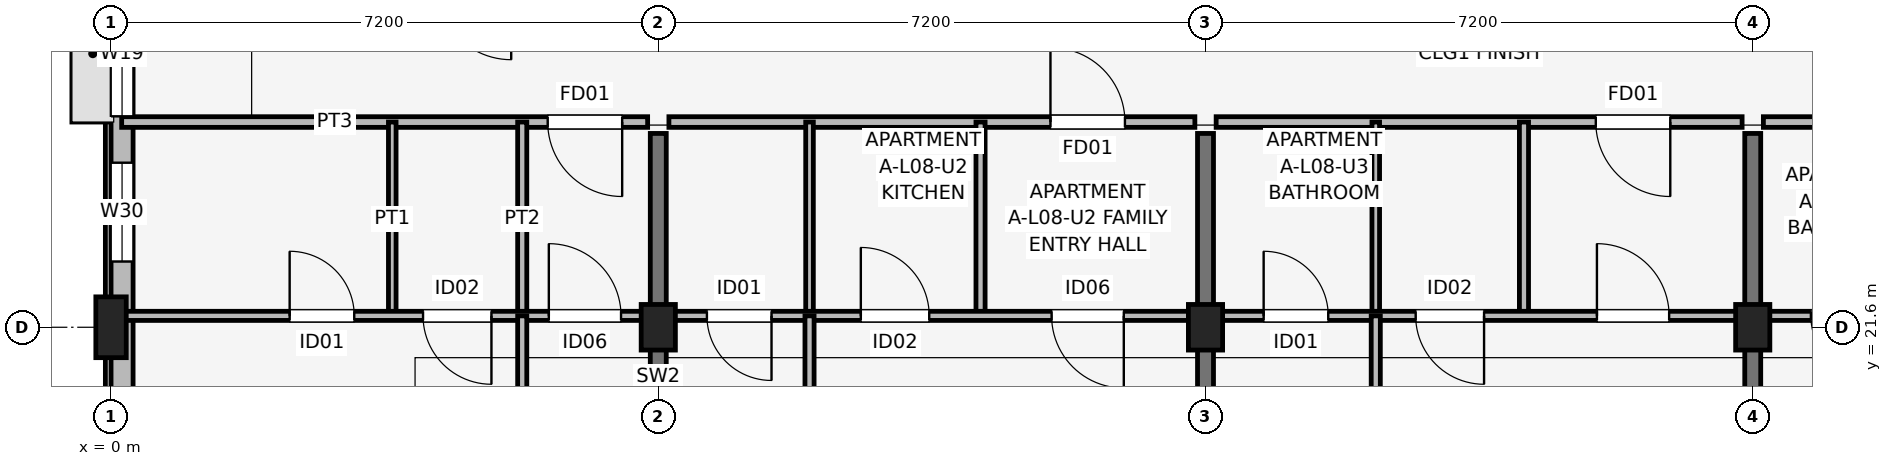
"""IFC4 building model, lengths in metres.
Left out: names, types, materials, properties, quantities, classifications, styles, units other than length and angle.
Written with IfcOpenShell. Run it as: python <this file> out.ifc"""

import sys

from ifc_helpers import new_model, si_unit, direction, frame, frame_2d, origin, origin_2d, place, context, subcontext, project, spatial, rectangle, extrude, element, fill, save


model = new_model("IFC4")
c1 = context("Model", 3, precision=1e-05, world=origin(), true_north=direction((0.0, 1.0)))
c2 = subcontext(c1, "Body", "Model", "MODEL_VIEW")
j1 = project(units=[si_unit("LENGTHUNIT", "METRE"), si_unit("PLANEANGLEUNIT", "RADIAN")], contexts=[c1])
p1 = place(None, origin())
s1 = spatial("IfcSite", under=j1, at=p1, CompositionType="ELEMENT")
p2 = place(p1, origin())
s2 = spatial("IfcBuilding", under=s1, at=p2, CompositionType="ELEMENT")
p3 = place(p2, frame((0.0, 0.0, 27.6)))
s3 = spatial("IfcBuildingStorey", under=s2, at=p3, CompositionType="ELEMENT", Elevation=27.6)
p4 = place(p3, frame((0.0, 21.6, 0.0), z_axis=(0.0, 0.0, 1.0), x_axis=(1.0, 0.0, 0.0)))
e1 = element("IfcColumn", 1, at=p4, inside=s3, PredefinedType="COLUMN", context=c2, shape_type="SweptSolid", body=[
    extrude(rectangle(XDim=0.4, YDim=0.8, at=origin_2d()), origin(), (0.0, 0.0, 1.0), 3.15),
])
for number, where, z_axis, x_axis in (
    (2, (7.2, 21.6, 0.0), (0.0, 0.0, 1.0), (1.0, 0.0, 0.0)),
    (3, (14.4, 21.6, 0.0), (0.0, 0.0, 1.0), (1.0, 0.0, 0.0)),
    (4, (21.6, 21.6, 0.0), (0.0, 0.0, 1.0), (1.0, 0.0, 0.0)),
):
    element("IfcColumn", number, at=place(p3, frame(where, z_axis=z_axis, x_axis=x_axis)), inside=s3, PredefinedType="COLUMN", context=c2, shape_type="SweptSolid", body=[
        extrude(rectangle(XDim=0.45, YDim=0.6, at=origin_2d()), origin(), (0.0, 0.0, 1.0), 3.15),
    ])
for number, where, z_axis, x_axis in (
    (5, (7.2, 17.75, 0.0), (0.0, 0.0, 1.0), (0.0, 1.0, 0.0)),
    (6, (14.4, 17.75, 0.0), (0.0, 0.0, 1.0), (0.0, 1.0, 0.0)),
    (7, (21.6, 17.75, 0.0), (0.0, 0.0, 1.0), (0.0, 1.0, 0.0)),
):
    element("IfcWall", number, at=place(p3, frame(where, z_axis=z_axis, x_axis=x_axis)), inside=s3, PredefinedType="SHEAR", context=c2, shape_type="SweptSolid", body=[
        extrude(rectangle(XDim=6.4, YDim=0.21, at=frame_2d((3.2, 0.0))), origin(), (0.0, 0.0, 1.0), 3.15),
    ])
p5 = place(p3, frame((0.145, 33.4, 0.0), z_axis=(0.0, 0.0, 1.0), x_axis=(0.0, -1.0, 0.0)))
e8 = element("IfcWall", 8, at=p5, inside=s3, PredefinedType="SOLIDWALL", context=c2, shape_type="SweptSolid", body=[
    extrude(rectangle(XDim=13.4, YDim=0.29, at=frame_2d((6.7, 0.0))), origin(), (0.0, 0.0, 1.0), 2.43),
])
p6 = place(p5, frame((7.375, 0.0, 1.05)))
e9 = element("IfcOpeningElement", 9, at=p6, cuts=e8, PredefinedType="OPENING", context=c2, shape_type="SweptSolid", body=[
    extrude(rectangle(XDim=1.65, YDim=1.15, at=frame_2d((0.825, 0.575))), frame((0.0, 0.155, 0.0), z_axis=(0.0, -1.0, 0.0), x_axis=(1.0, 0.0, 0.0)), (0.0, 0.0, 1.0), 0.31),
])
p7 = place(p5, frame((9.635, 0.0, 0.75)))
e10 = element("IfcOpeningElement", 10, at=p7, cuts=e8, PredefinedType="OPENING", context=c2, shape_type="SweptSolid", body=[
    extrude(rectangle(XDim=1.3, YDim=1.55, at=frame_2d((0.65, 0.775))), frame((0.0, 0.155, 0.0), z_axis=(0.0, -1.0, 0.0), x_axis=(1.0, 0.0, 0.0)), (0.0, 0.0, 1.0), 0.31),
])
p8 = place(p3, frame((0.14, 24.3, 0.0), z_axis=(0.0, 0.0, 1.0), x_axis=(1.0, 0.0, 0.0)))
e11 = element("IfcWall", 11, at=p8, inside=s3, PredefinedType="PARTITIONING", context=c2, shape_type="SweptSolid", body=[
    extrude(rectangle(XDim=6.92, YDim=0.14, at=frame_2d((3.46, 0.0))), origin(), (0.0, 0.0, 1.0), 2.38),
])
p9 = place(p8, frame((6.585, 0.0, 0.0), z_axis=(0.0, 0.0, 1.0), x_axis=(-1.0, 0.0, 0.0)))
e12 = element("IfcOpeningElement", 12, at=p9, cuts=e11, PredefinedType="OPENING", context=c2, shape_type="SweptSolid", body=[
    extrude(rectangle(XDim=0.98, YDim=2.1, at=frame_2d((0.49, 1.05))), frame((0.0, 0.08, 0.0), z_axis=(0.0, -1.0, 0.0), x_axis=(1.0, 0.0, 0.0)), (0.0, 0.0, 1.0), 0.16),
])
p10 = place(p3, frame((3.7, 21.75, 0.0), z_axis=(0.0, 0.0, 1.0), x_axis=(0.0, 1.0, 0.0)))
e13 = element("IfcWall", 13, at=p10, inside=s3, PredefinedType="PARTITIONING", context=c2, shape_type="SweptSolid", body=[
    extrude(rectangle(XDim=2.55, YDim=0.1, at=frame_2d((1.275, 0.0))), origin(), (0.0, 0.0, 1.0), 2.38),
])
p11 = place(p3, frame((5.41, 21.75, 0.0), z_axis=(0.0, 0.0, 1.0), x_axis=(0.0, 1.0, 0.0)))
e14 = element("IfcWall", 14, at=p11, inside=s3, PredefinedType="PARTITIONING", context=c2, shape_type="SweptSolid", body=[
    extrude(rectangle(XDim=2.55, YDim=0.12, at=frame_2d((1.275, 0.0))), origin(), (0.0, 0.0, 1.0), 2.38),
])
p12 = place(p3, frame((0.14, 21.75, 0.0), z_axis=(0.0, 0.0, 1.0), x_axis=(1.0, 0.0, 0.0)))
e15 = element("IfcWall", 15, at=p12, inside=s3, PredefinedType="PARTITIONING", context=c2, shape_type="SweptSolid", body=[
    extrude(rectangle(XDim=6.92, YDim=0.12, at=frame_2d((3.46, 0.0))), origin(), (0.0, 0.0, 1.0), 2.38),
])
p13 = place(p12, frame((2.21, 0.0, 0.0)))
e16 = element("IfcOpeningElement", 16, at=p13, cuts=e15, PredefinedType="OPENING", context=c2, shape_type="SweptSolid", body=[
    extrude(rectangle(XDim=0.85, YDim=2.08, at=frame_2d((0.425, 1.04))), frame((0.0, 0.07, 0.0), z_axis=(0.0, -1.0, 0.0), x_axis=(1.0, 0.0, 0.0)), (0.0, 0.0, 1.0), 0.14),
])
p14 = place(p12, frame((4.865, 0.0, 0.0), z_axis=(0.0, 0.0, 1.0), x_axis=(-1.0, 0.0, 0.0)))
e17 = element("IfcOpeningElement", 17, at=p14, cuts=e15, PredefinedType="OPENING", context=c2, shape_type="SweptSolid", body=[
    extrude(rectangle(XDim=0.9, YDim=2.08, at=frame_2d((0.45, 1.04))), frame((0.0, 0.07, 0.0), z_axis=(0.0, -1.0, 0.0), x_axis=(1.0, 0.0, 0.0)), (0.0, 0.0, 1.0), 0.14),
])
p15 = place(p12, frame((5.62, 0.0, 0.0)))
e18 = element("IfcOpeningElement", 18, at=p15, cuts=e15, PredefinedType="OPENING", context=c2, shape_type="SweptSolid", body=[
    extrude(rectangle(XDim=0.95, YDim=2.08, at=frame_2d((0.475, 1.04))), frame((0.0, 0.07, 0.0), z_axis=(0.0, -1.0, 0.0), x_axis=(1.0, 0.0, 0.0)), (0.0, 0.0, 1.0), 0.14),
])
p16 = place(p3, frame((5.41, 17.7, 0.0), z_axis=(0.0, 0.0, 1.0), x_axis=(0.0, 1.0, 0.0)))
e19 = element("IfcWall", 19, at=p16, inside=s3, PredefinedType="PARTITIONING", context=c2, shape_type="SweptSolid", body=[
    extrude(rectangle(XDim=4.05, YDim=0.12, at=frame_2d((2.025, 0.0))), origin(), (0.0, 0.0, 1.0), 2.38),
])
p17 = place(p16, frame((2.475, 0.0, 0.0), z_axis=(0.0, 0.0, 1.0), x_axis=(-1.0, 0.0, 0.0)))
e20 = element("IfcOpeningElement", 20, at=p17, cuts=e19, PredefinedType="OPENING", context=c2, shape_type="SweptSolid", body=[
    extrude(rectangle(XDim=0.9, YDim=2.08, at=frame_2d((0.45, 1.04))), frame((0.0, 0.07, 0.0), z_axis=(0.0, -1.0, 0.0), x_axis=(1.0, 0.0, 0.0)), (0.0, 0.0, 1.0), 0.14),
])
p18 = place(p3, frame((7.34, 24.3, 0.0), z_axis=(0.0, 0.0, 1.0), x_axis=(1.0, 0.0, 0.0)))
e21 = element("IfcWall", 21, at=p18, inside=s3, PredefinedType="PARTITIONING", context=c2, shape_type="SweptSolid", body=[
    extrude(rectangle(XDim=6.92, YDim=0.14, at=frame_2d((3.46, 0.0))), origin(), (0.0, 0.0, 1.0), 2.38),
])
p19 = place(p18, frame((5.02, 0.0, 0.0)))
e22 = element("IfcOpeningElement", 22, at=p19, cuts=e21, PredefinedType="OPENING", context=c2, shape_type="SweptSolid", body=[
    extrude(rectangle(XDim=0.98, YDim=2.1, at=frame_2d((0.49, 1.05))), frame((0.0, 0.08, 0.0), z_axis=(0.0, -1.0, 0.0), x_axis=(1.0, 0.0, 0.0)), (0.0, 0.0, 1.0), 0.16),
])
p20 = place(p3, frame((9.19, 21.75, 0.0), z_axis=(0.0, 0.0, 1.0), x_axis=(0.0, 1.0, 0.0)))
e23 = element("IfcWall", 23, at=p20, inside=s3, PredefinedType="PARTITIONING", context=c2, shape_type="SweptSolid", body=[
    extrude(rectangle(XDim=2.55, YDim=0.1, at=frame_2d((1.275, 0.0))), origin(), (0.0, 0.0, 1.0), 2.38),
])
p21 = place(p3, frame((11.44, 21.75, 0.0), z_axis=(0.0, 0.0, 1.0), x_axis=(0.0, 1.0, 0.0)))
e24 = element("IfcWall", 24, at=p21, inside=s3, PredefinedType="PARTITIONING", context=c2, shape_type="SweptSolid", body=[
    extrude(rectangle(XDim=2.55, YDim=0.12, at=frame_2d((1.275, 0.0))), origin(), (0.0, 0.0, 1.0), 2.38),
])
p22 = place(p3, frame((7.34, 21.75, 0.0), z_axis=(0.0, 0.0, 1.0), x_axis=(1.0, 0.0, 0.0)))
e25 = element("IfcWall", 25, at=p22, inside=s3, PredefinedType="PARTITIONING", context=c2, shape_type="SweptSolid", body=[
    extrude(rectangle(XDim=6.92, YDim=0.12, at=frame_2d((3.46, 0.0))), origin(), (0.0, 0.0, 1.0), 2.38),
])
p23 = place(p22, frame((1.35, 0.0, 0.0), z_axis=(0.0, 0.0, 1.0), x_axis=(-1.0, 0.0, 0.0)))
e26 = element("IfcOpeningElement", 26, at=p23, cuts=e25, PredefinedType="OPENING", context=c2, shape_type="SweptSolid", body=[
    extrude(rectangle(XDim=0.85, YDim=2.08, at=frame_2d((0.425, 1.04))), frame((0.0, 0.07, 0.0), z_axis=(0.0, -1.0, 0.0), x_axis=(1.0, 0.0, 0.0)), (0.0, 0.0, 1.0), 0.14),
])
p24 = place(p22, frame((2.525, 0.0, 0.0)))
e27 = element("IfcOpeningElement", 27, at=p24, cuts=e25, PredefinedType="OPENING", context=c2, shape_type="SweptSolid", body=[
    extrude(rectangle(XDim=0.9, YDim=2.08, at=frame_2d((0.45, 1.04))), frame((0.0, 0.07, 0.0), z_axis=(0.0, -1.0, 0.0), x_axis=(1.0, 0.0, 0.0)), (0.0, 0.0, 1.0), 0.14),
])
p25 = place(p22, frame((5.985, 0.0, 0.0), z_axis=(0.0, 0.0, 1.0), x_axis=(-1.0, 0.0, 0.0)))
e28 = element("IfcOpeningElement", 28, at=p25, cuts=e25, PredefinedType="OPENING", context=c2, shape_type="SweptSolid", body=[
    extrude(rectangle(XDim=0.95, YDim=2.08, at=frame_2d((0.475, 1.04))), frame((0.0, 0.07, 0.0), z_axis=(0.0, -1.0, 0.0), x_axis=(1.0, 0.0, 0.0)), (0.0, 0.0, 1.0), 0.14),
])
p26 = place(p3, frame((9.19, 17.7, 0.0), z_axis=(0.0, 0.0, 1.0), x_axis=(0.0, 1.0, 0.0)))
e29 = element("IfcWall", 29, at=p26, inside=s3, PredefinedType="PARTITIONING", context=c2, shape_type="SweptSolid", body=[
    extrude(rectangle(XDim=4.05, YDim=0.12, at=frame_2d((2.025, 0.0))), origin(), (0.0, 0.0, 1.0), 2.38),
])
p27 = place(p26, frame((1.575, 0.0, 0.0)))
e30 = element("IfcOpeningElement", 30, at=p27, cuts=e29, PredefinedType="OPENING", context=c2, shape_type="SweptSolid", body=[
    extrude(rectangle(XDim=0.9, YDim=2.08, at=frame_2d((0.45, 1.04))), frame((0.0, 0.07, 0.0), z_axis=(0.0, -1.0, 0.0), x_axis=(1.0, 0.0, 0.0)), (0.0, 0.0, 1.0), 0.14),
])
p28 = place(p3, frame((14.54, 24.3, 0.0), z_axis=(0.0, 0.0, 1.0), x_axis=(1.0, 0.0, 0.0)))
e31 = element("IfcWall", 31, at=p28, inside=s3, PredefinedType="PARTITIONING", context=c2, shape_type="SweptSolid", body=[
    extrude(rectangle(XDim=6.92, YDim=0.14, at=frame_2d((3.46, 0.0))), origin(), (0.0, 0.0, 1.0), 2.38),
])
p29 = place(p28, frame((5.975, 0.0, 0.0), z_axis=(0.0, 0.0, 1.0), x_axis=(-1.0, 0.0, 0.0)))
e32 = element("IfcOpeningElement", 32, at=p29, cuts=e31, PredefinedType="OPENING", context=c2, shape_type="SweptSolid", body=[
    extrude(rectangle(XDim=0.98, YDim=2.1, at=frame_2d((0.49, 1.05))), frame((0.0, 0.08, 0.0), z_axis=(0.0, -1.0, 0.0), x_axis=(1.0, 0.0, 0.0)), (0.0, 0.0, 1.0), 0.16),
])
p30 = place(p3, frame((16.64, 21.75, 0.0), z_axis=(0.0, 0.0, 1.0), x_axis=(0.0, 1.0, 0.0)))
e33 = element("IfcWall", 33, at=p30, inside=s3, PredefinedType="PARTITIONING", context=c2, shape_type="SweptSolid", body=[
    extrude(rectangle(XDim=2.55, YDim=0.1, at=frame_2d((1.275, 0.0))), origin(), (0.0, 0.0, 1.0), 2.38),
])
p31 = place(p3, frame((18.59, 21.75, 0.0), z_axis=(0.0, 0.0, 1.0), x_axis=(0.0, 1.0, 0.0)))
e34 = element("IfcWall", 34, at=p31, inside=s3, PredefinedType="PARTITIONING", context=c2, shape_type="SweptSolid", body=[
    extrude(rectangle(XDim=2.55, YDim=0.12, at=frame_2d((1.275, 0.0))), origin(), (0.0, 0.0, 1.0), 2.38),
])
p32 = place(p3, frame((14.54, 21.75, 0.0), z_axis=(0.0, 0.0, 1.0), x_axis=(1.0, 0.0, 0.0)))
e35 = element("IfcWall", 35, at=p32, inside=s3, PredefinedType="PARTITIONING", context=c2, shape_type="SweptSolid", body=[
    extrude(rectangle(XDim=6.92, YDim=0.12, at=frame_2d((3.46, 0.0))), origin(), (0.0, 0.0, 1.0), 2.38),
])
p33 = place(p32, frame((0.625, 0.0, 0.0)))
e36 = element("IfcOpeningElement", 36, at=p33, cuts=e35, PredefinedType="OPENING", context=c2, shape_type="SweptSolid", body=[
    extrude(rectangle(XDim=0.85, YDim=2.08, at=frame_2d((0.425, 1.04))), frame((0.0, 0.07, 0.0), z_axis=(0.0, -1.0, 0.0), x_axis=(1.0, 0.0, 0.0)), (0.0, 0.0, 1.0), 0.14),
])
p34 = place(p32, frame((3.525, 0.0, 0.0), z_axis=(0.0, 0.0, 1.0), x_axis=(-1.0, 0.0, 0.0)))
e37 = element("IfcOpeningElement", 37, at=p34, cuts=e35, PredefinedType="OPENING", context=c2, shape_type="SweptSolid", body=[
    extrude(rectangle(XDim=0.9, YDim=2.08, at=frame_2d((0.45, 1.04))), frame((0.0, 0.07, 0.0), z_axis=(0.0, -1.0, 0.0), x_axis=(1.0, 0.0, 0.0)), (0.0, 0.0, 1.0), 0.14),
])
p35 = place(p32, frame((5.01, 0.0, 0.0)))
e38 = element("IfcOpeningElement", 38, at=p35, cuts=e35, PredefinedType="OPENING", context=c2, shape_type="SweptSolid", body=[
    extrude(rectangle(XDim=0.95, YDim=2.08, at=frame_2d((0.475, 1.04))), frame((0.0, 0.07, 0.0), z_axis=(0.0, -1.0, 0.0), x_axis=(1.0, 0.0, 0.0)), (0.0, 0.0, 1.0), 0.14),
])
p36 = place(p3, frame((16.64, 17.7, 0.0), z_axis=(0.0, 0.0, 1.0), x_axis=(0.0, 1.0, 0.0)))
e39 = element("IfcWall", 39, at=p36, inside=s3, PredefinedType="PARTITIONING", context=c2, shape_type="SweptSolid", body=[
    extrude(rectangle(XDim=4.05, YDim=0.12, at=frame_2d((2.025, 0.0))), origin(), (0.0, 0.0, 1.0), 2.38),
])
p37 = place(p36, frame((2.475, 0.0, 0.0), z_axis=(0.0, 0.0, 1.0), x_axis=(-1.0, 0.0, 0.0)))
e40 = element("IfcOpeningElement", 40, at=p37, cuts=e39, PredefinedType="OPENING", context=c2, shape_type="SweptSolid", body=[
    extrude(rectangle(XDim=0.9, YDim=2.08, at=frame_2d((0.45, 1.04))), frame((0.0, 0.07, 0.0), z_axis=(0.0, -1.0, 0.0), x_axis=(1.0, 0.0, 0.0)), (0.0, 0.0, 1.0), 0.14),
])
p38 = place(p3, frame((21.74, 24.3, 0.0), z_axis=(0.0, 0.0, 1.0), x_axis=(1.0, 0.0, 0.0)))
e41 = element("IfcWall", 41, at=p38, inside=s3, PredefinedType="PARTITIONING", context=c2, shape_type="SweptSolid", body=[
    extrude(rectangle(XDim=6.92, YDim=0.14, at=frame_2d((3.46, 0.0))), origin(), (0.0, 0.0, 1.0), 2.38),
])
p39 = place(p38, frame((5.145, 0.0, 0.0)))
e42 = element("IfcOpeningElement", 42, at=p39, cuts=e41, PredefinedType="OPENING", context=c2, shape_type="SweptSolid", body=[
    extrude(rectangle(XDim=0.98, YDim=2.1, at=frame_2d((0.49, 1.05))), frame((0.0, 0.08, 0.0), z_axis=(0.0, -1.0, 0.0), x_axis=(1.0, 0.0, 0.0)), (0.0, 0.0, 1.0), 0.16),
])
p40 = place(p3, frame((21.74, 21.75, 0.0), z_axis=(0.0, 0.0, 1.0), x_axis=(1.0, 0.0, 0.0)))
e43 = element("IfcWall", 43, at=p40, inside=s3, PredefinedType="PARTITIONING", context=c2, shape_type="SweptSolid", body=[
    extrude(rectangle(XDim=6.92, YDim=0.12, at=frame_2d((3.46, 0.0))), origin(), (0.0, 0.0, 1.0), 2.38),
])
p41 = place(p40, frame((1.475, 0.0, 0.0), z_axis=(0.0, 0.0, 1.0), x_axis=(-1.0, 0.0, 0.0)))
e44 = element("IfcOpeningElement", 44, at=p41, cuts=e43, PredefinedType="OPENING", context=c2, shape_type="SweptSolid", body=[
    extrude(rectangle(XDim=0.85, YDim=2.08, at=frame_2d((0.425, 1.04))), frame((0.0, 0.07, 0.0), z_axis=(0.0, -1.0, 0.0), x_axis=(1.0, 0.0, 0.0)), (0.0, 0.0, 1.0), 0.14),
])
p42 = place(p40, frame((2.775, 0.0, 0.0)))
e45 = element("IfcOpeningElement", 45, at=p42, cuts=e43, PredefinedType="OPENING", context=c2, shape_type="SweptSolid", body=[
    extrude(rectangle(XDim=0.9, YDim=2.08, at=frame_2d((0.45, 1.04))), frame((0.0, 0.07, 0.0), z_axis=(0.0, -1.0, 0.0), x_axis=(1.0, 0.0, 0.0)), (0.0, 0.0, 1.0), 0.14),
])
p43 = place(p40, frame((6.11, 0.0, 0.0), z_axis=(0.0, 0.0, 1.0), x_axis=(-1.0, 0.0, 0.0)))
e46 = element("IfcOpeningElement", 46, at=p43, cuts=e43, PredefinedType="OPENING", context=c2, shape_type="SweptSolid", body=[
    extrude(rectangle(XDim=0.95, YDim=2.08, at=frame_2d((0.475, 1.04))), frame((0.0, 0.07, 0.0), z_axis=(0.0, -1.0, 0.0), x_axis=(1.0, 0.0, 0.0)), (0.0, 0.0, 1.0), 0.14),
])
p44 = place(p6, origin())
e47 = element("IfcWindow", 47, at=p44, inside=s3, PartitioningType="SINGLE_PANEL", PredefinedType="WINDOW", context=c2, shape_type="SweptSolid", body=[
    extrude(rectangle(XDim=1.65, YDim=1.15, at=frame_2d((0.825, 0.575))), frame((0.0, 0.03, 0.0), z_axis=(0.0, -1.0, 0.0), x_axis=(1.0, 0.0, 0.0)), (0.0, 0.0, 1.0), 0.06),
])
fill(e9, e47)
p45 = place(p7, origin())
e48 = element("IfcWindow", 48, at=p45, inside=s3, PartitioningType="SINGLE_PANEL", PredefinedType="WINDOW", context=c2, shape_type="SweptSolid", body=[
    extrude(rectangle(XDim=1.3, YDim=1.55, at=frame_2d((0.65, 0.775))), frame((0.0, 0.03, 0.0), z_axis=(0.0, -1.0, 0.0), x_axis=(1.0, 0.0, 0.0)), (0.0, 0.0, 1.0), 0.06),
])
fill(e10, e48)
p46 = place(p9, origin())
e49 = element("IfcDoor", 49, at=p46, inside=s3, OperationType="SINGLE_SWING_RIGHT", PredefinedType="DOOR", context=c2, shape_type="SweptSolid", body=[
    extrude(rectangle(XDim=0.98, YDim=2.1, at=frame_2d((0.49, 1.05))), frame((0.0, 0.025, 0.0), z_axis=(0.0, -1.0, 0.0), x_axis=(1.0, 0.0, 0.0)), (0.0, 0.0, 1.0), 0.05),
])
fill(e12, e49)
p47 = place(p13, origin())
e50 = element("IfcDoor", 50, at=p47, inside=s3, OperationType="SINGLE_SWING_LEFT", PredefinedType="DOOR", context=c2, shape_type="SweptSolid", body=[
    extrude(rectangle(XDim=0.85, YDim=2.08, at=frame_2d((0.425, 1.04))), frame((0.0, 0.025, 0.0), z_axis=(0.0, -1.0, 0.0), x_axis=(1.0, 0.0, 0.0)), (0.0, 0.0, 1.0), 0.05),
])
fill(e16, e50)
p48 = place(p14, origin())
e51 = element("IfcDoor", 51, at=p48, inside=s3, OperationType="SINGLE_SWING_RIGHT", PredefinedType="DOOR", context=c2, shape_type="SweptSolid", body=[
    extrude(rectangle(XDim=0.9, YDim=2.08, at=frame_2d((0.45, 1.04))), frame((0.0, 0.025, 0.0), z_axis=(0.0, -1.0, 0.0), x_axis=(1.0, 0.0, 0.0)), (0.0, 0.0, 1.0), 0.05),
])
fill(e17, e51)
p49 = place(p15, origin())
e52 = element("IfcDoor", 52, at=p49, inside=s3, OperationType="SINGLE_SWING_LEFT", PredefinedType="DOOR", context=c2, shape_type="SweptSolid", body=[
    extrude(rectangle(XDim=0.95, YDim=2.08, at=frame_2d((0.475, 1.04))), frame((0.0, 0.025, 0.0), z_axis=(0.0, -1.0, 0.0), x_axis=(1.0, 0.0, 0.0)), (0.0, 0.0, 1.0), 0.05),
])
fill(e18, e52)
p50 = place(p19, origin())
e53 = element("IfcDoor", 53, at=p50, inside=s3, OperationType="SINGLE_SWING_LEFT", PredefinedType="DOOR", context=c2, shape_type="SweptSolid", body=[
    extrude(rectangle(XDim=0.98, YDim=2.1, at=frame_2d((0.49, 1.05))), frame((0.0, 0.025, 0.0), z_axis=(0.0, -1.0, 0.0), x_axis=(1.0, 0.0, 0.0)), (0.0, 0.0, 1.0), 0.05),
])
fill(e22, e53)
p51 = place(p23, origin())
e54 = element("IfcDoor", 54, at=p51, inside=s3, OperationType="SINGLE_SWING_RIGHT", PredefinedType="DOOR", context=c2, shape_type="SweptSolid", body=[
    extrude(rectangle(XDim=0.85, YDim=2.08, at=frame_2d((0.425, 1.04))), frame((0.0, 0.025, 0.0), z_axis=(0.0, -1.0, 0.0), x_axis=(1.0, 0.0, 0.0)), (0.0, 0.0, 1.0), 0.05),
])
fill(e26, e54)
p52 = place(p24, origin())
e55 = element("IfcDoor", 55, at=p52, inside=s3, OperationType="SINGLE_SWING_LEFT", PredefinedType="DOOR", context=c2, shape_type="SweptSolid", body=[
    extrude(rectangle(XDim=0.9, YDim=2.08, at=frame_2d((0.45, 1.04))), frame((0.0, 0.025, 0.0), z_axis=(0.0, -1.0, 0.0), x_axis=(1.0, 0.0, 0.0)), (0.0, 0.0, 1.0), 0.05),
])
fill(e27, e55)
p53 = place(p25, origin())
e56 = element("IfcDoor", 56, at=p53, inside=s3, OperationType="SINGLE_SWING_RIGHT", PredefinedType="DOOR", context=c2, shape_type="SweptSolid", body=[
    extrude(rectangle(XDim=0.95, YDim=2.08, at=frame_2d((0.475, 1.04))), frame((0.0, 0.025, 0.0), z_axis=(0.0, -1.0, 0.0), x_axis=(1.0, 0.0, 0.0)), (0.0, 0.0, 1.0), 0.05),
])
fill(e28, e56)
p54 = place(p29, origin())
e57 = element("IfcDoor", 57, at=p54, inside=s3, OperationType="SINGLE_SWING_RIGHT", PredefinedType="DOOR", context=c2, shape_type="SweptSolid", body=[
    extrude(rectangle(XDim=0.98, YDim=2.1, at=frame_2d((0.49, 1.05))), frame((0.0, 0.025, 0.0), z_axis=(0.0, -1.0, 0.0), x_axis=(1.0, 0.0, 0.0)), (0.0, 0.0, 1.0), 0.05),
])
fill(e32, e57)
p55 = place(p33, origin())
e58 = element("IfcDoor", 58, at=p55, inside=s3, OperationType="SINGLE_SWING_LEFT", PredefinedType="DOOR", context=c2, shape_type="SweptSolid", body=[
    extrude(rectangle(XDim=0.85, YDim=2.08, at=frame_2d((0.425, 1.04))), frame((0.0, 0.025, 0.0), z_axis=(0.0, -1.0, 0.0), x_axis=(1.0, 0.0, 0.0)), (0.0, 0.0, 1.0), 0.05),
])
fill(e36, e58)
p56 = place(p34, origin())
e59 = element("IfcDoor", 59, at=p56, inside=s3, OperationType="SINGLE_SWING_RIGHT", PredefinedType="DOOR", context=c2, shape_type="SweptSolid", body=[
    extrude(rectangle(XDim=0.9, YDim=2.08, at=frame_2d((0.45, 1.04))), frame((0.0, 0.025, 0.0), z_axis=(0.0, -1.0, 0.0), x_axis=(1.0, 0.0, 0.0)), (0.0, 0.0, 1.0), 0.05),
])
fill(e37, e59)
p57 = place(p35, origin())
e60 = element("IfcDoor", 60, at=p57, inside=s3, OperationType="SINGLE_SWING_LEFT", PredefinedType="DOOR", context=c2, shape_type="SweptSolid", body=[
    extrude(rectangle(XDim=0.95, YDim=2.08, at=frame_2d((0.475, 1.04))), frame((0.0, 0.025, 0.0), z_axis=(0.0, -1.0, 0.0), x_axis=(1.0, 0.0, 0.0)), (0.0, 0.0, 1.0), 0.05),
])
fill(e38, e60)
p58 = place(p41, origin())
e61 = element("IfcDoor", 61, at=p58, inside=s3, OperationType="SINGLE_SWING_RIGHT", PredefinedType="DOOR", context=c2, shape_type="SweptSolid", body=[
    extrude(rectangle(XDim=0.85, YDim=2.08, at=frame_2d((0.425, 1.04))), frame((0.0, 0.025, 0.0), z_axis=(0.0, -1.0, 0.0), x_axis=(1.0, 0.0, 0.0)), (0.0, 0.0, 1.0), 0.05),
])
fill(e44, e61)
save(model, sys.argv[1])
